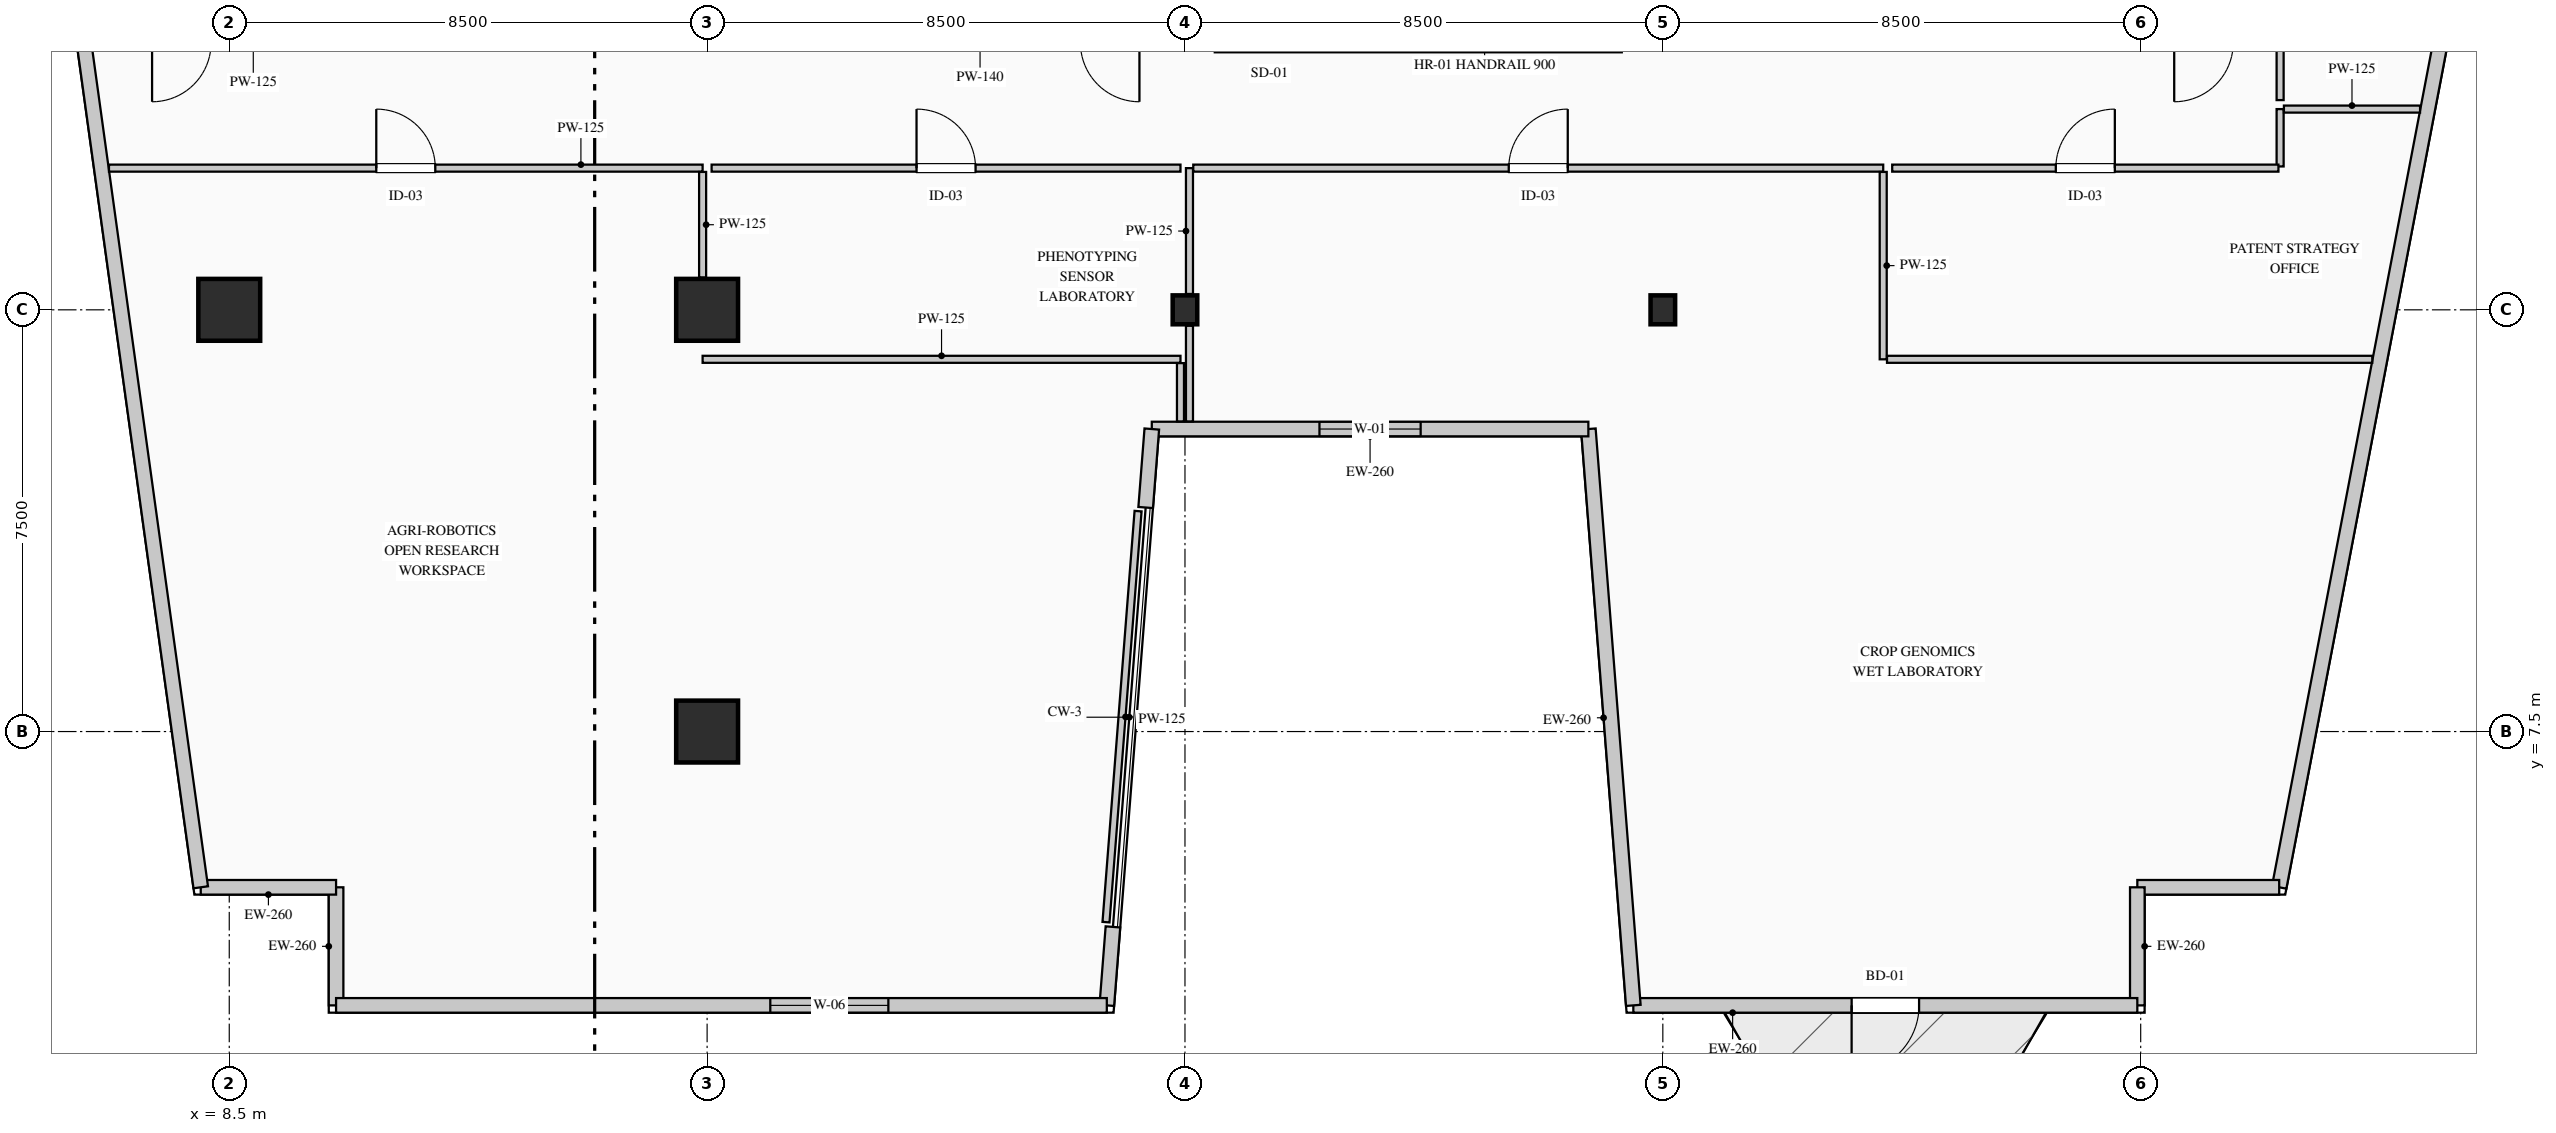
"""IFC4 building model, lengths in metres.
Left out: names, types, materials, properties, quantities, classifications, styles, units other than length and angle.
Written with IfcOpenShell. Run it as: python <this file> out.ifc"""

import sys

from ifc_helpers import new_model, si_unit, direction, frame, frame_2d, origin, origin_2d, place, context, subcontext, project, spatial, rectangle, i_section, extrude, element, fill, save


model = new_model("IFC4")
c1 = context("Model", 3, precision=1e-05, world=origin(), true_north=direction((0.0, 1.0)))
c2 = subcontext(c1, "Body", "Model", "MODEL_VIEW")
j1 = project(units=[si_unit("LENGTHUNIT", "METRE"), si_unit("PLANEANGLEUNIT", "RADIAN")], contexts=[c1])
p1 = place(None, origin())
s1 = spatial("IfcSite", under=j1, at=p1, CompositionType="ELEMENT")
p2 = place(p1, origin())
s2 = spatial("IfcBuilding", under=s1, at=p2, CompositionType="ELEMENT")
p3 = place(p2, frame((0.0, 0.0, 119.3)))
s3 = spatial("IfcBuildingStorey", under=s2, at=p3, CompositionType="ELEMENT", Elevation=119.3)
for number, where, z_axis, x_axis in (
    (1, (8.5, 15.0, 0.0), (0.0, 0.0, 1.0), (1.0, 0.0, 0.0)),
    (2, (17.0, 7.5, 0.0), (0.0, 0.0, 1.0), (1.0, 0.0, 0.0)),
    (3, (17.0, 15.0, 0.0), (0.0, 0.0, 1.0), (1.0, 0.0, 0.0)),
):
    element("IfcColumn", number, at=place(p3, frame(where, z_axis=z_axis, x_axis=x_axis)), inside=s3, PredefinedType="COLUMN", context=c2, shape_type="SweptSolid", body=[
        extrude(rectangle(XDim=1.1, YDim=1.1, at=origin_2d()), origin(), (0.0, 0.0, 1.0), 3.95),
    ])
for number, where, z_axis, x_axis in (
    (4, (25.5, 15.0, 0.0), (0.0, 0.0, 1.0), (1.0, 0.0, 0.0)),
    (5, (34.0, 15.0, 0.0), (0.0, 0.0, 1.0), (1.0, 0.0, 0.0)),
):
    element("IfcColumn", number, at=place(p3, frame(where, z_axis=z_axis, x_axis=x_axis)), inside=s3, PredefinedType="COLUMN", context=c2, shape_type="SweptSolid", body=[
        extrude(i_section(OverallWidth=0.437, OverallDepth=0.514, WebThickness=0.061, FlangeThickness=0.077, FilletRadius=0.015, at=origin_2d()), origin(), (0.0, 0.0, 1.0), 3.95),
    ])
p4 = place(p3, frame((10.4, 2.63, 0.0), z_axis=(0.0, 0.0, 1.0), x_axis=(0.0, 1.0, 0.0)))
e6 = element("IfcWall", 6, at=p4, inside=s3, PredefinedType="STANDARD", context=c2, shape_type="SweptSolid", body=[
    extrude(rectangle(XDim=2.1, YDim=0.26, at=frame_2d((1.05, 0.0))), origin(), (0.0, 0.0, 1.0), 3.69),
])
p5 = place(p3, frame((10.4, 4.73, 0.0), z_axis=(0.0, 0.0, 1.0), x_axis=(-1.0, 0.0, 0.0)))
e7 = element("IfcWall", 7, at=p5, inside=s3, PredefinedType="STANDARD", context=c2, shape_type="SweptSolid", body=[
    extrude(rectangle(XDim=2.407, YDim=0.26, at=frame_2d((1.204, 0.0))), origin(), (0.0, 0.0, 1.0), 3.69),
])
p6 = place(p3, frame((7.993, 4.73, 0.0), z_axis=(0.0, 0.0, 1.0), x_axis=(-0.136989009016, 0.990572567462, 0.0)))
e8 = element("IfcWall", 8, at=p6, inside=s3, PredefinedType="STANDARD", context=c2, shape_type="SweptSolid", body=[
    extrude(rectangle(XDim=36.888, YDim=0.26, at=frame_2d((18.444, 0.0))), origin(), (0.0, 0.0, 1.0), 3.69),
])
p7 = place(p6, frame((19.839, 0.0, 0.9)))
e9 = element("IfcOpeningElement", 9, at=p7, cuts=e8, PredefinedType="OPENING", context=c2, shape_type="SweptSolid", body=[
    extrude(rectangle(XDim=2.1, YDim=2.0, at=frame_2d((1.05, 1.0))), frame((0.0, 0.14, 0.0), z_axis=(0.0, -1.0, 0.0), x_axis=(1.0, 0.0, 0.0)), (0.0, 0.0, 1.0), 0.28),
])
p8 = place(p3, frame((51.942, 41.27, 0.0), z_axis=(0.0, 0.0, 1.0), x_axis=(-0.187592192405, -0.982247000173, 0.0)))
e10 = element("IfcWall", 10, at=p8, inside=s3, PredefinedType="STANDARD", context=c2, shape_type="SweptSolid", body=[
    extrude(rectangle(XDim=37.2, YDim=0.26, at=frame_2d((18.6, 0.0))), origin(), (0.0, 0.0, 1.0), 3.69),
])
p9 = place(p8, frame((12.342, 0.0, 0.9)))
e11 = element("IfcOpeningElement", 11, at=p9, cuts=e10, PredefinedType="OPENING", context=c2, shape_type="SweptSolid", body=[
    extrude(rectangle(XDim=2.1, YDim=2.0, at=frame_2d((1.05, 1.0))), frame((0.0, 0.14, 0.0), z_axis=(0.0, -1.0, 0.0), x_axis=(1.0, 0.0, 0.0)), (0.0, 0.0, 1.0), 0.28),
])
p10 = place(p3, frame((44.963, 4.73, 0.0), z_axis=(0.0, 0.0, 1.0), x_axis=(-1.0, 0.0, 0.0)))
e12 = element("IfcWall", 12, at=p10, inside=s3, PredefinedType="STANDARD", context=c2, shape_type="SweptSolid", body=[
    extrude(rectangle(XDim=2.523, YDim=0.26, at=frame_2d((1.262, 0.0))), origin(), (0.0, 0.0, 1.0), 3.69),
])
p11 = place(p3, frame((42.44, 4.73, 0.0), z_axis=(0.0, 0.0, 1.0), x_axis=(0.0, -1.0, 0.0)))
e13 = element("IfcWall", 13, at=p11, inside=s3, PredefinedType="STANDARD", context=c2, shape_type="SweptSolid", body=[
    extrude(rectangle(XDim=2.1, YDim=0.26, at=frame_2d((1.05, 0.0))), origin(), (0.0, 0.0, 1.0), 3.69),
])
p12 = place(p3, frame((42.44, 2.63, 0.0), z_axis=(0.0, 0.0, 1.0), x_axis=(-1.0, 0.0, 0.0)))
e14 = element("IfcWall", 14, at=p12, inside=s3, PredefinedType="STANDARD", context=c2, shape_type="SweptSolid", body=[
    extrude(rectangle(XDim=8.965, YDim=0.26, at=frame_2d((4.482, 0.0))), origin(), (0.0, 0.0, 1.0), 3.69),
])
p13 = place(p12, frame((3.882, 0.0, 0.0)))
e15 = element("IfcOpeningElement", 15, at=p13, cuts=e14, PredefinedType="OPENING", context=c2, shape_type="SweptSolid", body=[
    extrude(rectangle(XDim=1.2, YDim=2.2, at=frame_2d((0.6, 1.1))), frame((0.0, 0.14, 0.0), z_axis=(0.0, -1.0, 0.0), x_axis=(1.0, 0.0, 0.0)), (0.0, 0.0, 1.0), 0.28),
])
p14 = place(p3, frame((33.475, 2.63, 0.0), z_axis=(0.0, 0.0, 1.0), x_axis=(-0.077793257511, 0.996969512616, 0.0)))
e16 = element("IfcWall", 16, at=p14, inside=s3, PredefinedType="STANDARD", context=c2, shape_type="SweptSolid", body=[
    extrude(rectangle(XDim=10.281, YDim=0.26, at=frame_2d((5.141, 0.0))), origin(), (0.0, 0.0, 1.0), 3.69),
])
p15 = place(p3, frame((32.675, 12.88, 0.0), z_axis=(0.0, 0.0, 1.0), x_axis=(-1.0, 0.0, 0.0)))
e17 = element("IfcWall", 17, at=p15, inside=s3, PredefinedType="STANDARD", context=c2, shape_type="SweptSolid", body=[
    extrude(rectangle(XDim=7.765, YDim=0.26, at=frame_2d((3.883, 0.0))), origin(), (0.0, 0.0, 1.0), 3.69),
])
p16 = place(p15, frame((2.983, 0.0, 0.9)))
e18 = element("IfcOpeningElement", 18, at=p16, cuts=e17, PredefinedType="OPENING", context=c2, shape_type="SweptSolid", body=[
    extrude(rectangle(XDim=1.8, YDim=2.1, at=frame_2d((0.9, 1.05))), frame((0.0, 0.14, 0.0), z_axis=(0.0, -1.0, 0.0), x_axis=(1.0, 0.0, 0.0)), (0.0, 0.0, 1.0), 0.28),
])
for number, where, z_axis, x_axis in (
    (19, (24.91, 12.88, 0.0), (0.0, 0.0, 1.0), (-0.078, -0.997, 0.0)),
    (20, (24.219, 4.026, 0.0), (0.0, 0.0, 1.0), (-0.078, -0.997, 0.0)),
):
    element("IfcWall", number, at=place(p3, frame(where, z_axis=z_axis, x_axis=x_axis)), inside=s3, PredefinedType="STANDARD", context=c2, shape_type="SweptSolid", body=[
        extrude(rectangle(XDim=1.4, YDim=0.26, at=frame_2d((0.7, 0.0))), origin(), (0.0, 0.0, 1.0), 3.69),
    ])
p17 = place(p3, frame((24.11, 2.63, 0.0), z_axis=(0.0, 0.0, 1.0), x_axis=(-1.0, 0.0, 0.0)))
e21 = element("IfcWall", 21, at=p17, inside=s3, PredefinedType="STANDARD", context=c2, shape_type="SweptSolid", body=[
    extrude(rectangle(XDim=13.71, YDim=0.26, at=frame_2d((6.855, 0.0))), origin(), (0.0, 0.0, 1.0), 3.69),
])
p18 = place(p17, frame((3.886, 0.0, 0.9)))
e22 = element("IfcOpeningElement", 22, at=p18, cuts=e21, PredefinedType="OPENING", context=c2, shape_type="SweptSolid", body=[
    extrude(rectangle(XDim=2.1, YDim=2.0, at=frame_2d((1.05, 1.0))), frame((0.0, 0.14, 0.0), z_axis=(0.0, -1.0, 0.0), x_axis=(1.0, 0.0, 0.0)), (0.0, 0.0, 1.0), 0.28),
])
p19 = place(p3, frame((6.36, 17.52, 0.0), z_axis=(0.0, 0.0, 1.0), x_axis=(1.0, 0.0, 0.0)))
e23 = element("IfcWall", 23, at=p19, inside=s3, PredefinedType="PARTITIONING", context=c2, shape_type="SweptSolid", body=[
    extrude(rectangle(XDim=10.56, YDim=0.125, at=frame_2d((5.28, 0.0))), origin(), (0.0, 0.0, 1.0), 3.69),
])
p20 = place(p19, frame((4.755, 0.0, 0.0)))
e24 = element("IfcOpeningElement", 24, at=p20, cuts=e23, PredefinedType="OPENING", context=c2, shape_type="SweptSolid", body=[
    extrude(rectangle(XDim=1.05, YDim=2.15, at=frame_2d((0.525, 1.075))), frame((0.0, 0.073, 0.0), z_axis=(0.0, -1.0, 0.0), x_axis=(1.0, 0.0, 0.0)), (0.0, 0.0, 1.0), 0.145),
])
p21 = place(p3, frame((16.92, 17.452, 0.0), z_axis=(0.0, 0.0, 1.0), x_axis=(0.0, -1.0, 0.0)))
e25 = element("IfcWall", 25, at=p21, inside=s3, PredefinedType="PARTITIONING", context=c2, shape_type="SweptSolid", body=[
    extrude(rectangle(XDim=1.877, YDim=0.125, at=frame_2d((0.939, 0.0))), origin(), (0.0, 0.0, 1.0), 3.69),
])
p22 = place(p3, frame((16.92, 14.12, 0.0), z_axis=(0.0, 0.0, 1.0), x_axis=(1.0, 0.0, 0.0)))
e26 = element("IfcWall", 26, at=p22, inside=s3, PredefinedType="PARTITIONING", context=c2, shape_type="SweptSolid", body=[
    extrude(rectangle(XDim=8.5, YDim=0.125, at=frame_2d((4.25, 0.0))), origin(), (0.0, 0.0, 1.0), 3.69),
])
p23 = place(p3, frame((25.42, 14.052, 0.0), z_axis=(0.0, 0.0, 1.0), x_axis=(0.0, -1.0, 0.0)))
e27 = element("IfcWall", 27, at=p23, inside=s3, PredefinedType="PARTITIONING", context=c2, shape_type="SweptSolid", body=[
    extrude(rectangle(XDim=1.038, YDim=0.125, at=frame_2d((0.519, 0.0))), origin(), (0.0, 0.0, 1.0), 3.69),
])
p24 = place(p3, frame((24.666, 11.42, 0.0), z_axis=(0.0, 0.0, 1.0), x_axis=(-0.077816821526, -0.996967673642, 0.0)))
e28 = element("IfcWall", 28, at=p24, inside=s3, PredefinedType="PARTITIONING", context=c2, shape_type="SweptSolid", body=[
    extrude(rectangle(XDim=7.332, YDim=0.125, at=frame_2d((3.666, 0.0))), origin(), (0.0, 0.0, 1.0), 3.69),
])
p25 = place(p3, frame((25.58, 13.015, 0.0), z_axis=(0.0, 0.0, 1.0), x_axis=(0.0, 1.0, 0.0)))
e29 = element("IfcWall", 29, at=p25, inside=s3, PredefinedType="PARTITIONING", context=c2, shape_type="SweptSolid", body=[
    extrude(rectangle(XDim=1.703, YDim=0.125, at=frame_2d((0.852, 0.0))), origin(), (0.0, 0.0, 1.0), 3.69),
])
p26 = place(p3, frame((25.58, 15.282, 0.0), z_axis=(0.0, 0.0, 1.0), x_axis=(0.0, 1.0, 0.0)))
e30 = element("IfcWall", 30, at=p26, inside=s3, PredefinedType="PARTITIONING", context=c2, shape_type="SweptSolid", body=[
    extrude(rectangle(XDim=2.238, YDim=0.125, at=frame_2d((1.119, 0.0))), origin(), (0.0, 0.0, 1.0), 2.875),
])
p27 = place(p3, frame((25.647, 17.52, 0.0), z_axis=(0.0, 0.0, 1.0), x_axis=(1.0, 0.0, 0.0)))
e31 = element("IfcWall", 31, at=p27, inside=s3, PredefinedType="PARTITIONING", context=c2, shape_type="SweptSolid", body=[
    extrude(rectangle(XDim=12.272, YDim=0.125, at=frame_2d((6.136, 0.0))), origin(), (0.0, 0.0, 1.0), 3.475),
])
p28 = place(p27, frame((5.611, 0.0, 0.0)))
e32 = element("IfcOpeningElement", 32, at=p28, cuts=e31, PredefinedType="OPENING", context=c2, shape_type="SweptSolid", body=[
    extrude(rectangle(XDim=1.05, YDim=2.15, at=frame_2d((0.525, 1.075))), frame((0.0, 0.073, 0.0), z_axis=(0.0, -1.0, 0.0), x_axis=(1.0, 0.0, 0.0)), (0.0, 0.0, 1.0), 0.145),
])
p29 = place(p3, frame((37.92, 17.452, 0.0), z_axis=(0.0, 0.0, 1.0), x_axis=(0.0, -1.0, 0.0)))
e33 = element("IfcWall", 33, at=p29, inside=s3, PredefinedType="PARTITIONING", context=c2, shape_type="SweptSolid", body=[
    extrude(rectangle(XDim=3.332, YDim=0.125, at=frame_2d((1.666, 0.0))), origin(), (0.0, 0.0, 1.0), 3.69),
])
p30 = place(p3, frame((37.988, 14.12, 0.0), z_axis=(0.0, 0.0, 1.0), x_axis=(1.0, 0.0, 0.0)))
e34 = element("IfcWall", 34, at=p30, inside=s3, PredefinedType="PARTITIONING", context=c2, shape_type="SweptSolid", body=[
    extrude(rectangle(XDim=8.632, YDim=0.125, at=frame_2d((4.316, 0.0))), origin(), (0.0, 0.0, 1.0), 3.69),
])
p31 = place(p3, frame((17.08, 17.52, 0.0), z_axis=(0.0, 0.0, 1.0), x_axis=(1.0, 0.0, 0.0)))
e35 = element("IfcWall", 35, at=p31, inside=s3, PredefinedType="PARTITIONING", context=c2, shape_type="SweptSolid", body=[
    extrude(rectangle(XDim=8.34, YDim=0.125, at=frame_2d((4.17, 0.0))), origin(), (0.0, 0.0, 1.0), 3.69),
])
p32 = place(p31, frame((3.645, 0.0, 0.0)))
e36 = element("IfcOpeningElement", 36, at=p32, cuts=e35, PredefinedType="OPENING", context=c2, shape_type="SweptSolid", body=[
    extrude(rectangle(XDim=1.05, YDim=2.15, at=frame_2d((0.525, 1.075))), frame((0.0, 0.073, 0.0), z_axis=(0.0, -1.0, 0.0), x_axis=(1.0, 0.0, 0.0)), (0.0, 0.0, 1.0), 0.145),
])
p33 = place(p3, frame((44.98, 17.55, 0.0), z_axis=(0.0, 0.0, 1.0), x_axis=(0.0, 1.0, 0.0)))
e37 = element("IfcWall", 37, at=p33, inside=s3, PredefinedType="PARTITIONING", context=c2, shape_type="SweptSolid", body=[
    extrude(rectangle(XDim=1.02, YDim=0.125, at=frame_2d((0.51, 0.0))), origin(), (0.0, 0.0, 1.0), 3.69),
])
p34 = place(p3, frame((45.048, 18.57, 0.0), z_axis=(0.0, 0.0, 1.0), x_axis=(1.0, 0.0, 0.0)))
e38 = element("IfcWall", 38, at=p34, inside=s3, PredefinedType="PARTITIONING", context=c2, shape_type="SweptSolid", body=[
    extrude(rectangle(XDim=2.422, YDim=0.125, at=frame_2d((1.211, 0.0))), origin(), (0.0, 0.0, 1.0), 3.69),
])
p35 = place(p3, frame((38.08, 17.52, 0.0), z_axis=(0.0, 0.0, 1.0), x_axis=(1.0, 0.0, 0.0)))
e39 = element("IfcWall", 39, at=p35, inside=s3, PredefinedType="PARTITIONING", context=c2, shape_type="SweptSolid", body=[
    extrude(rectangle(XDim=6.87, YDim=0.125, at=frame_2d((3.435, 0.0))), origin(), (0.0, 0.0, 1.0), 3.69),
])
p36 = place(p35, frame((2.91, 0.0, 0.0)))
e40 = element("IfcOpeningElement", 40, at=p36, cuts=e39, PredefinedType="OPENING", context=c2, shape_type="SweptSolid", body=[
    extrude(rectangle(XDim=1.05, YDim=2.15, at=frame_2d((0.525, 1.075))), frame((0.0, 0.073, 0.0), z_axis=(0.0, -1.0, 0.0), x_axis=(1.0, 0.0, 0.0)), (0.0, 0.0, 1.0), 0.145),
])
p37 = place(p3, frame((44.98, 18.73, 0.0), z_axis=(0.0, 0.0, 1.0), x_axis=(0.0, 1.0, 0.0)))
e41 = element("IfcWall", 41, at=p37, inside=s3, PredefinedType="PARTITIONING", context=c2, shape_type="SweptSolid", body=[
    extrude(rectangle(XDim=1.02, YDim=0.125, at=frame_2d((0.51, 0.0))), origin(), (0.0, 0.0, 1.0), 3.69),
])
p38 = place(p13, origin())
e42 = element("IfcDoor", 42, at=p38, inside=s3, OperationType="SINGLE_SWING_RIGHT", PredefinedType="DOOR", context=c2, shape_type="SweptSolid", body=[
    extrude(rectangle(XDim=1.2, YDim=2.2, at=frame_2d((0.6, 1.1))), frame((0.0, 0.025, 0.0), z_axis=(0.0, -1.0, 0.0), x_axis=(1.0, 0.0, 0.0)), (0.0, 0.0, 1.0), 0.05),
])
fill(e15, e42)
p39 = place(p16, origin())
e43 = element("IfcWindow", 43, at=p39, inside=s3, PartitioningType="SINGLE_PANEL", PredefinedType="WINDOW", context=c2, shape_type="SweptSolid", body=[
    extrude(rectangle(XDim=1.8, YDim=2.1, at=frame_2d((0.9, 1.05))), frame((0.0, 0.03, 0.0), z_axis=(0.0, -1.0, 0.0), x_axis=(1.0, 0.0, 0.0)), (0.0, 0.0, 1.0), 0.06),
])
fill(e18, e43)
p40 = place(p18, origin())
e44 = element("IfcWindow", 44, at=p40, inside=s3, PartitioningType="DOUBLE_PANEL_VERTICAL", PredefinedType="WINDOW", context=c2, shape_type="SweptSolid", body=[
    extrude(rectangle(XDim=2.1, YDim=2.0, at=frame_2d((1.05, 1.0))), frame((0.0, 0.03, 0.0), z_axis=(0.0, -1.0, 0.0), x_axis=(1.0, 0.0, 0.0)), (0.0, 0.0, 1.0), 0.06),
])
fill(e22, e44)
p41 = place(p20, origin())
e45 = element("IfcDoor", 45, at=p41, inside=s3, OperationType="SINGLE_SWING_LEFT", PredefinedType="DOOR", context=c2, shape_type="SweptSolid", body=[
    extrude(rectangle(XDim=1.05, YDim=2.15, at=frame_2d((0.525, 1.075))), frame((0.0, 0.025, 0.0), z_axis=(0.0, -1.0, 0.0), x_axis=(1.0, 0.0, 0.0)), (0.0, 0.0, 1.0), 0.05),
])
fill(e24, e45)
p42 = place(p28, origin())
e46 = element("IfcDoor", 46, at=p42, inside=s3, OperationType="SINGLE_SWING_RIGHT", PredefinedType="DOOR", context=c2, shape_type="SweptSolid", body=[
    extrude(rectangle(XDim=1.05, YDim=2.15, at=frame_2d((0.525, 1.075))), frame((0.0, 0.025, 0.0), z_axis=(0.0, -1.0, 0.0), x_axis=(1.0, 0.0, 0.0)), (0.0, 0.0, 1.0), 0.05),
])
fill(e32, e46)
p43 = place(p32, origin())
e47 = element("IfcDoor", 47, at=p43, inside=s3, OperationType="SINGLE_SWING_LEFT", PredefinedType="DOOR", context=c2, shape_type="SweptSolid", body=[
    extrude(rectangle(XDim=1.05, YDim=2.15, at=frame_2d((0.525, 1.075))), frame((0.0, 0.025, 0.0), z_axis=(0.0, -1.0, 0.0), x_axis=(1.0, 0.0, 0.0)), (0.0, 0.0, 1.0), 0.05),
])
fill(e36, e47)
p44 = place(p36, origin())
e48 = element("IfcDoor", 48, at=p44, inside=s3, OperationType="SINGLE_SWING_RIGHT", PredefinedType="DOOR", context=c2, shape_type="SweptSolid", body=[
    extrude(rectangle(XDim=1.05, YDim=2.15, at=frame_2d((0.525, 1.075))), frame((0.0, 0.025, 0.0), z_axis=(0.0, -1.0, 0.0), x_axis=(1.0, 0.0, 0.0)), (0.0, 0.0, 1.0), 0.05),
])
fill(e40, e48)
save(model, sys.argv[1])
